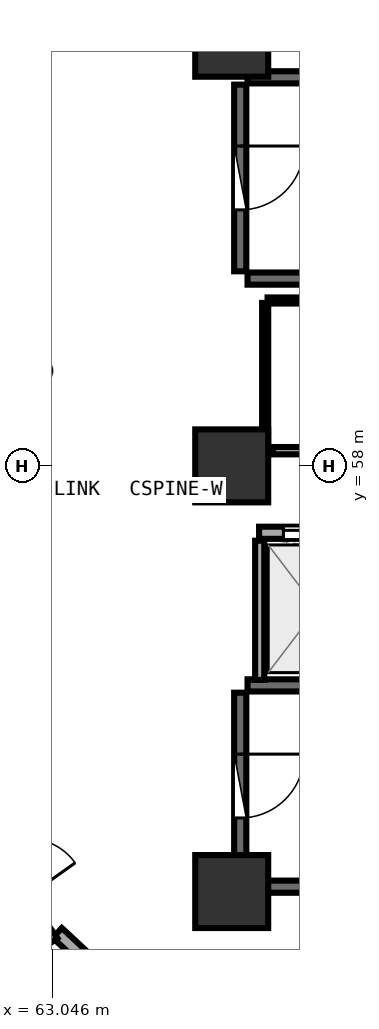
"""IFC4 building model, lengths in metres.
Left out: names, types, materials, properties, quantities, classifications, styles, units other than length and angle.
Written with IfcOpenShell. Run it as: python <this file> out.ifc"""

import sys

from ifc_helpers import new_model, si_unit, direction, frame, frame_2d, origin, origin_2d, place, context, subcontext, project, spatial, rectangle, extrude, element, fill, save


model = new_model("IFC4")
c1 = context("Model", 3, precision=1e-05, world=origin(), true_north=direction((0.0, 1.0)))
c2 = subcontext(c1, "Body", "Model", "MODEL_VIEW")
j1 = project(units=[si_unit("LENGTHUNIT", "METRE"), si_unit("PLANEANGLEUNIT", "RADIAN")], contexts=[c1])
p1 = place(None, origin())
s1 = spatial("IfcSite", under=j1, at=p1, CompositionType="ELEMENT")
p2 = place(p1, origin())
s2 = spatial("IfcBuilding", under=s1, at=p2, CompositionType="ELEMENT")
p3 = place(p2, frame((0.0, 0.0, 169.35)))
s3 = spatial("IfcBuildingStorey", under=s2, at=p3, CompositionType="ELEMENT", Elevation=169.35)
for number, where, z_axis, x_axis in (
    (1, (66.0, 51.0, 0.0), (0.0, 0.0, 1.0), (1.0, 0.0, 0.0)),
    (2, (66.0, 65.0, 0.0), (0.0, 0.0, 1.0), (1.0, 0.0, 0.0)),
    (3, (66.0, 58.0, 0.0), (0.0, 0.0, 1.0), (1.0, 0.0, 0.0)),
):
    element("IfcColumn", number, at=place(p3, frame(where, z_axis=z_axis, x_axis=x_axis)), inside=s3, PredefinedType="PILASTER", context=c2, shape_type="SweptSolid", body=[
        extrude(rectangle(XDim=1.2, YDim=1.2, at=origin_2d()), origin(), (0.0, 0.0, 1.0), 3.75),
    ])
for number, where, z_axis, x_axis in (
    (4, (66.26, 61.08, 0.0), (0.0, 0.0, 1.0), (1.0, 0.0, 0.0)),
    (5, (73.42, 64.39, 0.0), (0.0, 0.0, 1.0), (-1.0, 0.0, 0.0)),
):
    element("IfcWall", number, at=place(p3, frame(where, z_axis=z_axis, x_axis=x_axis)), inside=s3, PredefinedType="SHEAR", context=c2, shape_type="SweptSolid", body=[
        extrude(rectangle(XDim=7.16, YDim=0.2, at=frame_2d((3.58, 0.0))), origin(), (0.0, 0.0, 1.0), 3.49),
    ])
p4 = place(p3, frame((66.14, 64.27, 0.0), z_axis=(0.0, 0.0, 1.0), x_axis=(0.0, -1.0, 0.0)))
e6 = element("IfcWall", 6, at=p4, inside=s3, PredefinedType="SHEAR", context=c2, shape_type="SweptSolid", body=[
    extrude(rectangle(XDim=3.07, YDim=0.2, at=frame_2d((1.535, 0.0))), origin(), (0.0, 0.0, 1.0), 3.49),
])
p5 = place(p4, frame((1.01, 0.0, 0.0)))
e7 = element("IfcOpeningElement", 7, at=p5, cuts=e6, PredefinedType="OPENING", context=c2, shape_type="SweptSolid", body=[
    extrude(rectangle(XDim=1.05, YDim=2.1, at=frame_2d((0.525, 1.05))), frame((0.0, 0.11, 0.0), z_axis=(0.0, -1.0, 0.0), x_axis=(1.0, 0.0, 0.0)), (0.0, 0.0, 1.0), 0.22),
])
for number, where, z_axis, x_axis in (
    (8, (66.26, 51.08, 0.0), (0.0, 0.0, 1.0), (1.0, 0.0, 0.0)),
    (9, (73.42, 54.39, 0.0), (0.0, 0.0, 1.0), (-1.0, 0.0, 0.0)),
):
    element("IfcWall", number, at=place(p3, frame(where, z_axis=z_axis, x_axis=x_axis)), inside=s3, PredefinedType="SHEAR", context=c2, shape_type="SweptSolid", body=[
        extrude(rectangle(XDim=7.16, YDim=0.2, at=frame_2d((3.58, 0.0))), origin(), (0.0, 0.0, 1.0), 3.49),
    ])
p6 = place(p3, frame((66.14, 54.27, 0.0), z_axis=(0.0, 0.0, 1.0), x_axis=(0.0, -1.0, 0.0)))
e10 = element("IfcWall", 10, at=p6, inside=s3, PredefinedType="SHEAR", context=c2, shape_type="SweptSolid", body=[
    extrude(rectangle(XDim=3.07, YDim=0.2, at=frame_2d((1.535, 0.0))), origin(), (0.0, 0.0, 1.0), 3.49),
])
p7 = place(p6, frame((1.01, 0.0, 0.0)))
e11 = element("IfcOpeningElement", 11, at=p7, cuts=e10, PredefinedType="OPENING", context=c2, shape_type="SweptSolid", body=[
    extrude(rectangle(XDim=1.05, YDim=2.1, at=frame_2d((0.525, 1.05))), frame((0.0, 0.11, 0.0), z_axis=(0.0, -1.0, 0.0), x_axis=(1.0, 0.0, 0.0)), (0.0, 0.0, 1.0), 0.22),
])
p8 = place(p3, frame((66.45, 56.9, 0.0), z_axis=(0.0, 0.0, 1.0), x_axis=(1.0, 0.0, 0.0)))
e12 = element("IfcWall", 12, at=p8, inside=s3, PredefinedType="SOLIDWALL", context=c2, shape_type="SweptSolid", body=[
    extrude(rectangle(XDim=14.4, YDim=0.2, at=frame_2d((7.2, 0.0))), origin(), (0.0, 0.0, 1.0), 3.48),
])
p9 = place(p8, frame((0.4, 0.0, 0.0)))
e13 = element("IfcOpeningElement", 13, at=p9, cuts=e12, PredefinedType="OPENING", context=c2, shape_type="SweptSolid", body=[
    extrude(rectangle(XDim=1.1, YDim=2.1, at=frame_2d((0.55, 1.05))), frame((0.0, 0.11, 0.0), z_axis=(0.0, -1.0, 0.0), x_axis=(1.0, 0.0, 0.0)), (0.0, 0.0, 1.0), 0.22),
])
p10 = place(p8, frame((2.4, 0.0, 0.0)))
e14 = element("IfcOpeningElement", 14, at=p10, cuts=e12, PredefinedType="OPENING", context=c2, shape_type="SweptSolid", body=[
    extrude(rectangle(XDim=1.1, YDim=2.1, at=frame_2d((0.55, 1.05))), frame((0.0, 0.11, 0.0), z_axis=(0.0, -1.0, 0.0), x_axis=(1.0, 0.0, 0.0)), (0.0, 0.0, 1.0), 0.22),
])
p11 = place(p8, frame((4.4, 0.0, 0.0)))
e15 = element("IfcOpeningElement", 15, at=p11, cuts=e12, PredefinedType="OPENING", context=c2, shape_type="SweptSolid", body=[
    extrude(rectangle(XDim=1.1, YDim=2.1, at=frame_2d((0.55, 1.05))), frame((0.0, 0.11, 0.0), z_axis=(0.0, -1.0, 0.0), x_axis=(1.0, 0.0, 0.0)), (0.0, 0.0, 1.0), 0.22),
])
p12 = place(p3, frame((66.46, 54.48, 0.0), z_axis=(0.0, 0.0, 1.0), x_axis=(0.0, 1.0, 0.0)))
e16 = element("IfcWall", 16, at=p12, inside=s3, PredefinedType="PARTITIONING", context=c2, shape_type="SweptSolid", body=[
    extrude(rectangle(XDim=2.29, YDim=0.15, at=frame_2d((1.145, 0.0))), origin(), (0.0, 0.0, 1.0), 3.48),
])
p13 = place(p3, frame((66.675, 58.25, 0.0), z_axis=(0.0, 0.0, 1.0), x_axis=(1.0, 0.0, 0.0)))
e17 = element("IfcWall", 17, at=p13, inside=s3, PredefinedType="PARTITIONING", context=c2, shape_type="SweptSolid", body=[
    extrude(rectangle(XDim=5.715, YDim=0.12, at=frame_2d((2.857, 0.0))), origin(), (0.0, 0.0, 1.0), 3.48),
])
p14 = place(p13, frame((2.407, 0.0, 0.0)))
e18 = element("IfcOpeningElement", 18, at=p14, cuts=e17, PredefinedType="OPENING", context=c2, shape_type="SweptSolid", body=[
    extrude(rectangle(XDim=0.9, YDim=2.08, at=frame_2d((0.45, 1.04))), frame((0.0, 0.07, 0.0), z_axis=(0.0, -1.0, 0.0), x_axis=(1.0, 0.0, 0.0)), (0.0, 0.0, 1.0), 0.14),
])
p15 = place(p3, frame((72.41, 60.72, 0.0), z_axis=(0.0, 0.0, 1.0), x_axis=(-1.0, 0.0, 0.0)))
e19 = element("IfcWall", 19, at=p15, inside=s3, PredefinedType="PARTITIONING", context=c2, shape_type="SweptSolid", body=[
    extrude(rectangle(XDim=5.82, YDim=0.1, at=frame_2d((2.91, 0.0))), origin(), (0.0, 0.0, 1.0), 3.48),
])
p16 = place(p3, frame((66.55, 60.68, 0.0), z_axis=(0.0, 0.0, 1.0), x_axis=(0.0, -1.0, 0.0)))
e20 = element("IfcWall", 20, at=p16, inside=s3, PredefinedType="PARTITIONING", context=c2, shape_type="SweptSolid", body=[
    extrude(rectangle(XDim=2.383, YDim=0.1, at=frame_2d((1.191, 0.0))), origin(), (0.0, 0.0, 1.0), 3.48),
])
p17 = place(p3, frame((63.131, 50.32, 0.0), z_axis=(0.0, 0.0, 1.0), x_axis=(0.73204531194, -0.681255944023, 0.0)))
e21 = element("IfcWall", 21, at=p17, inside=s3, PredefinedType="SOLIDWALL", context=c2, shape_type="SweptSolid", body=[
    extrude(rectangle(XDim=2.663, YDim=0.22, at=frame_2d((1.332, 0.0))), origin(), (0.0, 0.0, 1.0), 2.975),
])
p18 = place(p3, frame((56.634, 45.784, 0.0), z_axis=(0.0, 0.0, 1.0), x_axis=(0.817143941798, 0.576433672145, 0.0)))
e22 = element("IfcWall", 22, at=p18, inside=s3, PredefinedType="SOLIDWALL", context=c2, shape_type="SweptSolid", body=[
    extrude(rectangle(XDim=7.876, YDim=0.22, at=frame_2d((3.938, 0.0))), origin(), (0.0, 0.0, 1.0), 3.025),
])
p19 = place(p5, origin())
e23 = element("IfcDoor", 23, at=p19, inside=s3, OperationType="SINGLE_SWING_LEFT", PredefinedType="DOOR", context=c2, shape_type="SweptSolid", body=[
    extrude(rectangle(XDim=1.05, YDim=2.1, at=frame_2d((0.525, 1.05))), frame((0.0, 0.025, 0.0), z_axis=(0.0, -1.0, 0.0), x_axis=(1.0, 0.0, 0.0)), (0.0, 0.0, 1.0), 0.05),
])
fill(e7, e23)
p20 = place(p7, origin())
e24 = element("IfcDoor", 24, at=p20, inside=s3, OperationType="SINGLE_SWING_LEFT", PredefinedType="DOOR", context=c2, shape_type="SweptSolid", body=[
    extrude(rectangle(XDim=1.05, YDim=2.1, at=frame_2d((0.525, 1.05))), frame((0.0, 0.025, 0.0), z_axis=(0.0, -1.0, 0.0), x_axis=(1.0, 0.0, 0.0)), (0.0, 0.0, 1.0), 0.05),
])
fill(e11, e24)
p21 = place(p9, origin())
e25 = element("IfcDoor", 25, at=p21, inside=s3, OperationType="DOUBLE_DOOR_SLIDING", PredefinedType="DOOR", context=c2, shape_type="SweptSolid", body=[
    extrude(rectangle(XDim=1.1, YDim=2.1, at=frame_2d((0.55, 1.05))), frame((0.0, 0.025, 0.0), z_axis=(0.0, -1.0, 0.0), x_axis=(1.0, 0.0, 0.0)), (0.0, 0.0, 1.0), 0.05),
])
fill(e13, e25)
save(model, sys.argv[1])
